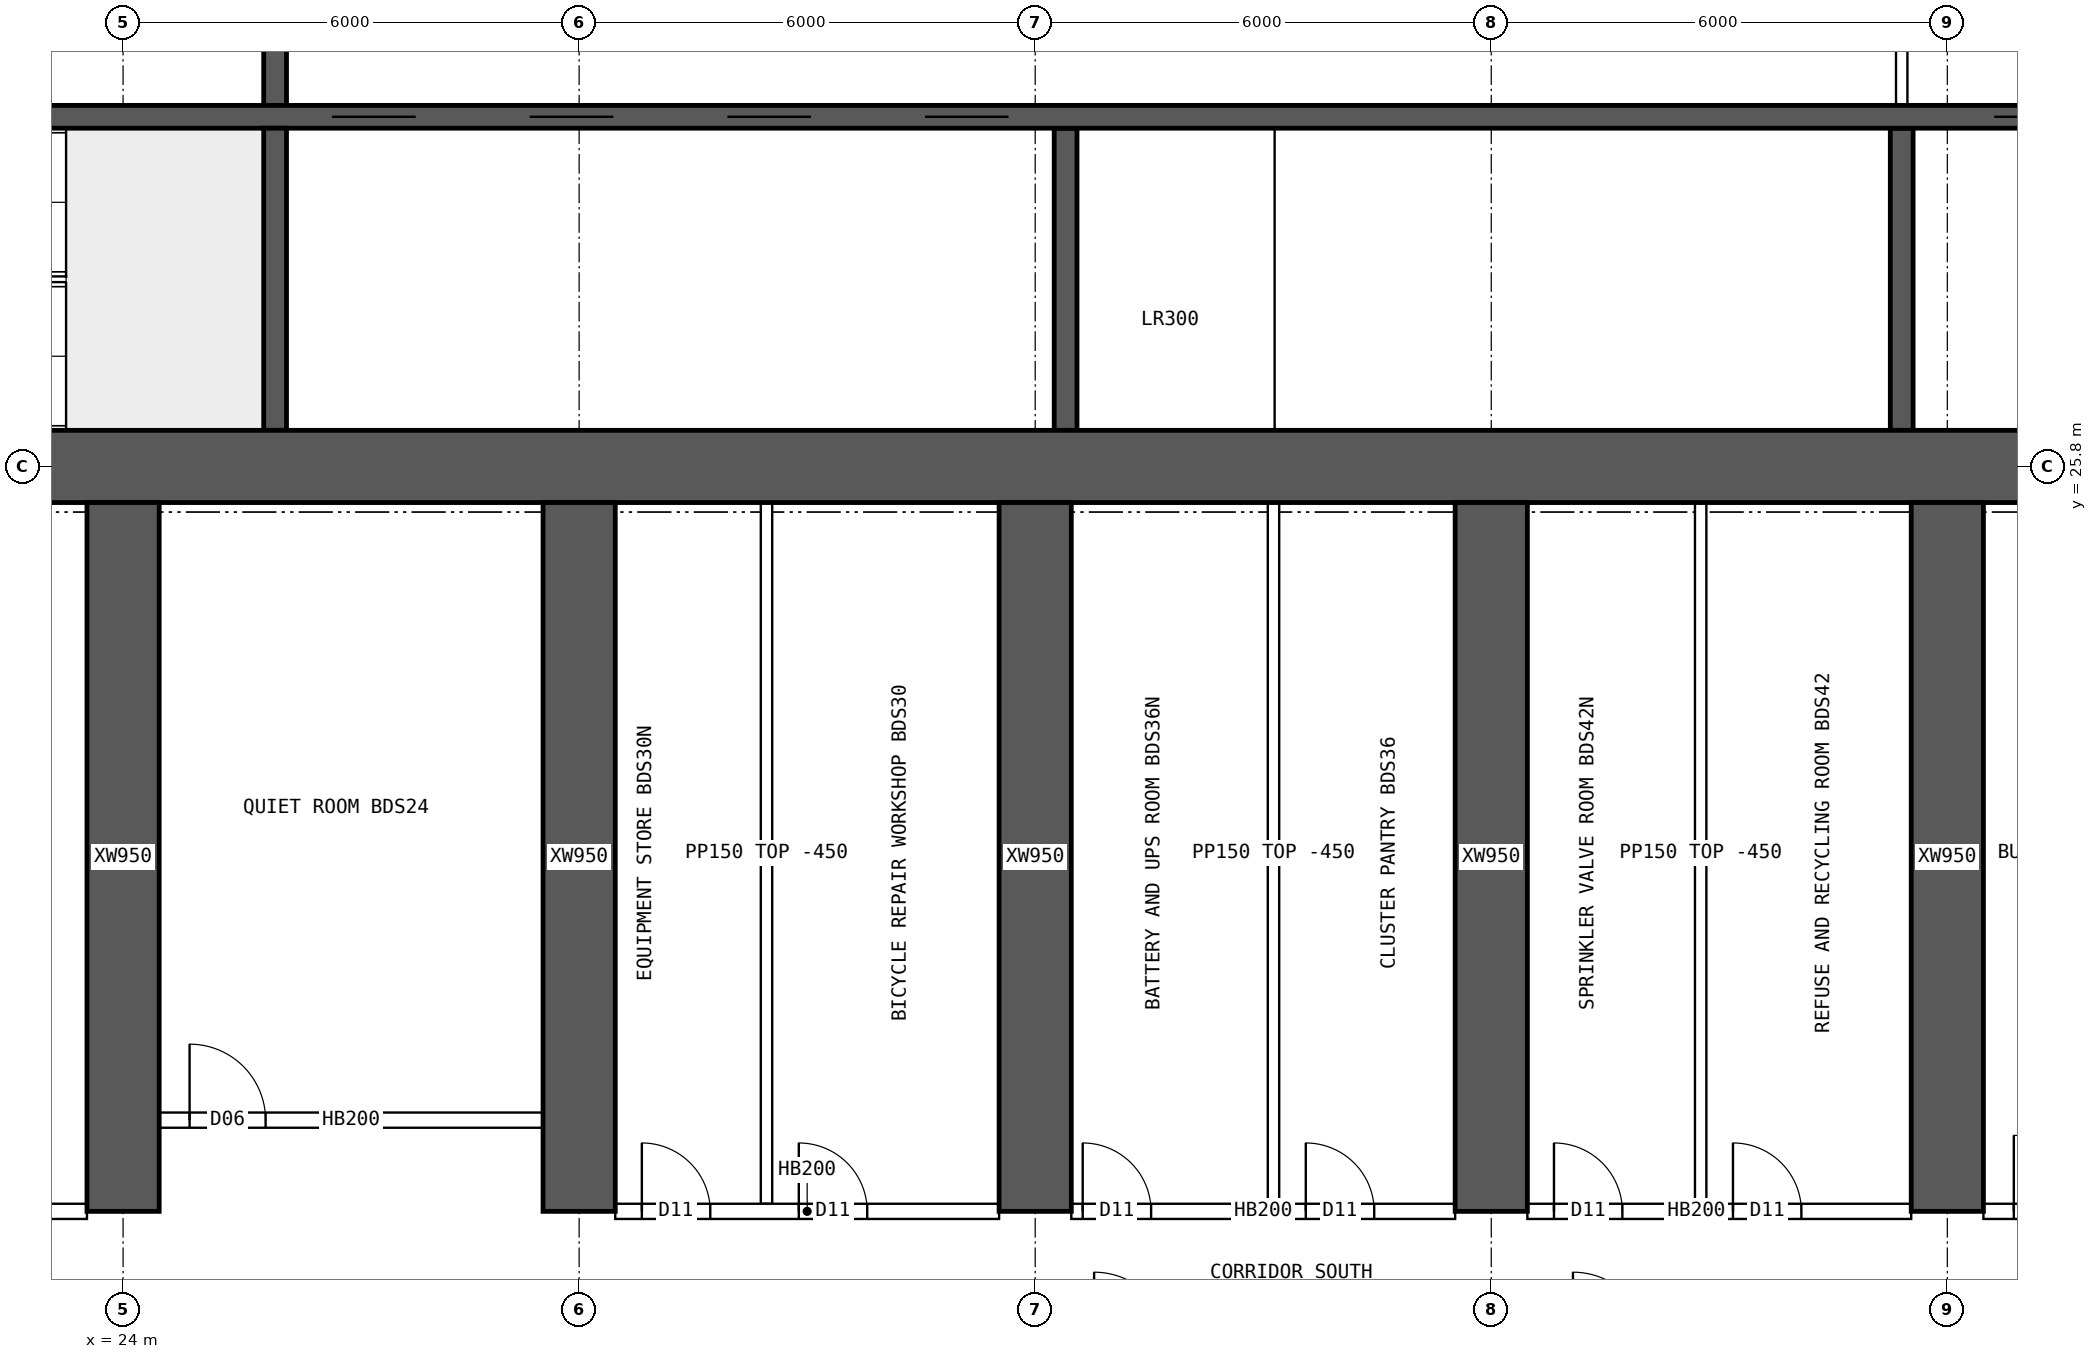
"""IFC4 building model, lengths in metres.
Left out: names, types, materials, properties, quantities, classifications, styles, units other than length and angle.
Written with IfcOpenShell. Run it as: python <this file> out.ifc"""

import sys

from ifc_helpers import new_model, si_unit, direction, frame, frame_2d, origin, place, context, subcontext, project, spatial, rectangle, extrude, element, fill, save


model = new_model("IFC4")
c1 = context("Model", 3, precision=1e-05, world=origin(), true_north=direction((0.0, 1.0)))
c2 = subcontext(c1, "Body", "Model", "MODEL_VIEW")
j1 = project(units=[si_unit("LENGTHUNIT", "METRE"), si_unit("PLANEANGLEUNIT", "RADIAN")], contexts=[c1])
p1 = place(None, origin())
s1 = spatial("IfcSite", under=j1, at=p1, CompositionType="ELEMENT")
p2 = place(p1, origin())
s2 = spatial("IfcBuilding", under=s1, at=p2, CompositionType="ELEMENT")
p3 = place(p2, frame((0.0, 0.0, 80.65)))
s3 = spatial("IfcBuildingStorey", under=s2, at=p3, CompositionType="ELEMENT", Elevation=80.65)
p4 = place(p3, frame((18.0, 25.8, 0.0), z_axis=(0.0, 0.0, 1.0), x_axis=(1.0, 0.0, 0.0)))
e1 = element("IfcWall", 1, at=p4, inside=s3, PredefinedType="SHEAR", context=c2, shape_type="SweptSolid", body=[
    extrude(rectangle(XDim=48.0, YDim=0.95, at=frame_2d((24.0, 0.0))), origin(), (0.0, 0.0, 1.0), 3.75),
])
p5 = place(p3, frame((18.475, 30.4, 0.0), z_axis=(0.0, 0.0, 1.0), x_axis=(1.0, 0.0, 0.0)))
e2 = element("IfcWall", 2, at=p5, inside=s3, PredefinedType="SHEAR", context=c2, shape_type="SweptSolid", body=[
    extrude(rectangle(XDim=47.05, YDim=0.3, at=frame_2d((23.525, 0.0))), origin(), (0.0, 0.0, 1.0), 3.75),
])
p6 = place(p5, frame((0.4, 0.0, 0.0)))
e3 = element("IfcOpeningElement", 3, at=p6, cuts=e2, PredefinedType="OPENING", context=c2, shape_type="SweptSolid", body=[
    extrude(rectangle(XDim=1.0, YDim=2.1, at=frame_2d((0.5, 1.05))), frame((0.0, 0.16, 0.0), z_axis=(0.0, -1.0, 0.0), x_axis=(1.0, 0.0, 0.0)), (0.0, 0.0, 1.0), 0.32),
])
p7 = place(p5, frame((45.65, 0.0, 0.0)))
e4 = element("IfcOpeningElement", 4, at=p7, cuts=e2, PredefinedType="OPENING", context=c2, shape_type="SweptSolid", body=[
    extrude(rectangle(XDim=1.0, YDim=2.1, at=frame_2d((0.5, 1.05))), frame((0.0, 0.16, 0.0), z_axis=(0.0, -1.0, 0.0), x_axis=(1.0, 0.0, 0.0)), (0.0, 0.0, 1.0), 0.32),
])
p8 = place(p5, frame((8.275, 0.0, 0.0)))
e5 = element("IfcOpeningElement", 5, at=p8, cuts=e2, PredefinedType="OPENING", context=c2, shape_type="SweptSolid", body=[
    extrude(rectangle(XDim=1.1, YDim=2.1, at=frame_2d((0.55, 1.05))), frame((0.0, 0.16, 0.0), z_axis=(0.0, -1.0, 0.0), x_axis=(1.0, 0.0, 0.0)), (0.0, 0.0, 1.0), 0.32),
])
p9 = place(p5, frame((10.875, 0.0, 0.0)))
e6 = element("IfcOpeningElement", 6, at=p9, cuts=e2, PredefinedType="OPENING", context=c2, shape_type="SweptSolid", body=[
    extrude(rectangle(XDim=1.1, YDim=2.1, at=frame_2d((0.55, 1.05))), frame((0.0, 0.16, 0.0), z_axis=(0.0, -1.0, 0.0), x_axis=(1.0, 0.0, 0.0)), (0.0, 0.0, 1.0), 0.32),
])
p10 = place(p5, frame((13.475, 0.0, 0.0)))
e7 = element("IfcOpeningElement", 7, at=p10, cuts=e2, PredefinedType="OPENING", context=c2, shape_type="SweptSolid", body=[
    extrude(rectangle(XDim=1.1, YDim=2.1, at=frame_2d((0.55, 1.05))), frame((0.0, 0.16, 0.0), z_axis=(0.0, -1.0, 0.0), x_axis=(1.0, 0.0, 0.0)), (0.0, 0.0, 1.0), 0.32),
])
p11 = place(p5, frame((16.075, 0.0, 0.0)))
e8 = element("IfcOpeningElement", 8, at=p11, cuts=e2, PredefinedType="OPENING", context=c2, shape_type="SweptSolid", body=[
    extrude(rectangle(XDim=1.1, YDim=2.1, at=frame_2d((0.55, 1.05))), frame((0.0, 0.16, 0.0), z_axis=(0.0, -1.0, 0.0), x_axis=(1.0, 0.0, 0.0)), (0.0, 0.0, 1.0), 0.32),
])
p12 = place(p5, frame((30.142, 0.0, 0.0)))
e9 = element("IfcOpeningElement", 9, at=p12, cuts=e2, PredefinedType="OPENING", context=c2, shape_type="SweptSolid", body=[
    extrude(rectangle(XDim=1.1, YDim=2.1, at=frame_2d((0.55, 1.05))), frame((0.0, 0.16, 0.0), z_axis=(0.0, -1.0, 0.0), x_axis=(1.0, 0.0, 0.0)), (0.0, 0.0, 1.0), 0.32),
])
p13 = place(p5, frame((33.675, 0.0, 0.0)))
e10 = element("IfcOpeningElement", 10, at=p13, cuts=e2, PredefinedType="OPENING", context=c2, shape_type="SweptSolid", body=[
    extrude(rectangle(XDim=1.1, YDim=2.1, at=frame_2d((0.55, 1.05))), frame((0.0, 0.16, 0.0), z_axis=(0.0, -1.0, 0.0), x_axis=(1.0, 0.0, 0.0)), (0.0, 0.0, 1.0), 0.32),
])
p14 = place(p5, frame((37.208, 0.0, 0.0)))
e11 = element("IfcOpeningElement", 11, at=p14, cuts=e2, PredefinedType="OPENING", context=c2, shape_type="SweptSolid", body=[
    extrude(rectangle(XDim=1.1, YDim=2.1, at=frame_2d((0.55, 1.05))), frame((0.0, 0.16, 0.0), z_axis=(0.0, -1.0, 0.0), x_axis=(1.0, 0.0, 0.0)), (0.0, 0.0, 1.0), 0.32),
])
p15 = place(p3, frame((26.0, 26.275, 0.0), z_axis=(0.0, 0.0, 1.0), x_axis=(0.0, 1.0, 0.0)))
e12 = element("IfcWall", 12, at=p15, inside=s3, PredefinedType="SHEAR", context=c2, shape_type="SweptSolid", body=[
    extrude(rectangle(XDim=3.975, YDim=0.3, at=frame_2d((1.988, 0.0))), origin(), (0.0, 0.0, 1.0), 3.75),
])
p16 = place(p3, frame((26.0, 30.55, 0.0), z_axis=(0.0, 0.0, 1.0), x_axis=(0.0, 1.0, 0.0)))
e13 = element("IfcWall", 13, at=p16, inside=s3, PredefinedType="SHEAR", context=c2, shape_type="SweptSolid", body=[
    extrude(rectangle(XDim=3.9, YDim=0.3, at=frame_2d((1.95, 0.0))), origin(), (0.0, 0.0, 1.0), 3.75),
])
p17 = place(p16, frame((1.4, 0.0, 0.0)))
e14 = element("IfcOpeningElement", 14, at=p17, cuts=e13, PredefinedType="OPENING", context=c2, shape_type="SweptSolid", body=[
    extrude(rectangle(XDim=1.2, YDim=2.1, at=frame_2d((0.6, 1.05))), frame((0.0, 0.16, 0.0), z_axis=(0.0, -1.0, 0.0), x_axis=(1.0, 0.0, 0.0)), (0.0, 0.0, 1.0), 0.32),
])
for number, where, z_axis, x_axis in (
    (15, (36.4, 26.275, 0.0), (0.0, 0.0, 1.0), (0.0, 1.0, 0.0)),
    (16, (47.4, 26.275, 0.0), (0.0, 0.0, 1.0), (0.0, 1.0, 0.0)),
):
    element("IfcWall", number, at=place(p3, frame(where, z_axis=z_axis, x_axis=x_axis)), inside=s3, PredefinedType="SHEAR", context=c2, shape_type="SweptSolid", body=[
        extrude(rectangle(XDim=3.975, YDim=0.3, at=frame_2d((1.988, 0.0))), origin(), (0.0, 0.0, 1.0), 3.75),
    ])
for number, where, z_axis, x_axis in (
    (17, (24.0, 16.0, 0.0), (0.0, 0.0, 1.0), (0.0, 1.0, 0.0)),
    (18, (30.0, 16.0, 0.0), (0.0, 0.0, 1.0), (0.0, 1.0, 0.0)),
    (19, (36.0, 16.0, 0.0), (0.0, 0.0, 1.0), (0.0, 1.0, 0.0)),
    (20, (42.0, 16.0, 0.0), (0.0, 0.0, 1.0), (0.0, 1.0, 0.0)),
    (21, (48.0, 16.0, 0.0), (0.0, 0.0, 1.0), (0.0, 1.0, 0.0)),
):
    element("IfcWall", number, at=place(p3, frame(where, z_axis=z_axis, x_axis=x_axis)), inside=s3, PredefinedType="SHEAR", context=c2, shape_type="SweptSolid", body=[
        extrude(rectangle(XDim=9.325, YDim=0.95, at=frame_2d((4.663, 0.0))), origin(), (0.0, 0.0, 1.0), 3.75),
    ])
p18 = place(p3, frame((47.4, 30.55, 0.0), z_axis=(0.0, 0.0, 1.0), x_axis=(0.0, 1.0, 0.0)))
e22 = element("IfcWall", 22, at=p18, inside=s3, PredefinedType="SOLIDWALL", context=c2, shape_type="SweptSolid", body=[
    extrude(rectangle(XDim=3.9, YDim=0.15, at=frame_2d((1.95, 0.0))), origin(), (0.0, 0.0, 1.0), 3.3),
])
p19 = place(p18, frame((1.15, 0.0, 0.0)))
e23 = element("IfcOpeningElement", 23, at=p19, cuts=e22, PredefinedType="OPENING", context=c2, shape_type="SweptSolid", body=[
    extrude(rectangle(XDim=1.6, YDim=2.1, at=frame_2d((0.8, 1.05))), frame((0.0, 0.085, 0.0), z_axis=(0.0, -1.0, 0.0), x_axis=(1.0, 0.0, 0.0)), (0.0, 0.0, 1.0), 0.17),
])
p20 = place(p3, frame((18.475, 16.0, 0.0), z_axis=(0.0, 0.0, 1.0), x_axis=(1.0, 0.0, 0.0)))
e24 = element("IfcWall", 24, at=p20, inside=s3, PredefinedType="SOLIDWALL", context=c2, shape_type="SweptSolid", body=[
    extrude(rectangle(XDim=5.05, YDim=0.2, at=frame_2d((2.525, 0.0))), origin(), (0.0, 0.0, 1.0), 3.3),
])
p21 = place(p20, frame((0.35, 0.0, 0.0)))
e25 = element("IfcOpeningElement", 25, at=p21, cuts=e24, PredefinedType="OPENING", context=c2, shape_type="SweptSolid", body=[
    extrude(rectangle(XDim=0.9, YDim=2.1, at=frame_2d((0.45, 1.05))), frame((0.0, 0.11, 0.0), z_axis=(0.0, -1.0, 0.0), x_axis=(1.0, 0.0, 0.0)), (0.0, 0.0, 1.0), 0.22),
])
p22 = place(p20, frame((3.215, 0.0, 0.0)))
e26 = element("IfcOpeningElement", 26, at=p22, cuts=e24, PredefinedType="OPENING", context=c2, shape_type="SweptSolid", body=[
    extrude(rectangle(XDim=0.9, YDim=2.1, at=frame_2d((0.45, 1.05))), frame((0.0, 0.11, 0.0), z_axis=(0.0, -1.0, 0.0), x_axis=(1.0, 0.0, 0.0)), (0.0, 0.0, 1.0), 0.22),
])
p23 = place(p3, frame((30.475, 16.0, 0.0), z_axis=(0.0, 0.0, 1.0), x_axis=(1.0, 0.0, 0.0)))
e27 = element("IfcWall", 27, at=p23, inside=s3, PredefinedType="SOLIDWALL", context=c2, shape_type="SweptSolid", body=[
    extrude(rectangle(XDim=5.05, YDim=0.2, at=frame_2d((2.525, 0.0))), origin(), (0.0, 0.0, 1.0), 3.3),
])
p24 = place(p23, frame((0.35, 0.0, 0.0)))
e28 = element("IfcOpeningElement", 28, at=p24, cuts=e27, PredefinedType="OPENING", context=c2, shape_type="SweptSolid", body=[
    extrude(rectangle(XDim=0.9, YDim=2.1, at=frame_2d((0.45, 1.05))), frame((0.0, 0.11, 0.0), z_axis=(0.0, -1.0, 0.0), x_axis=(1.0, 0.0, 0.0)), (0.0, 0.0, 1.0), 0.22),
])
p25 = place(p23, frame((2.415, 0.0, 0.0)))
e29 = element("IfcOpeningElement", 29, at=p25, cuts=e27, PredefinedType="OPENING", context=c2, shape_type="SweptSolid", body=[
    extrude(rectangle(XDim=0.9, YDim=2.1, at=frame_2d((0.45, 1.05))), frame((0.0, 0.11, 0.0), z_axis=(0.0, -1.0, 0.0), x_axis=(1.0, 0.0, 0.0)), (0.0, 0.0, 1.0), 0.22),
])
p26 = place(p3, frame((36.475, 16.0, 0.0), z_axis=(0.0, 0.0, 1.0), x_axis=(1.0, 0.0, 0.0)))
e30 = element("IfcWall", 30, at=p26, inside=s3, PredefinedType="SOLIDWALL", context=c2, shape_type="SweptSolid", body=[
    extrude(rectangle(XDim=5.05, YDim=0.2, at=frame_2d((2.525, 0.0))), origin(), (0.0, 0.0, 1.0), 3.3),
])
p27 = place(p26, frame((0.15, 0.0, 0.0)))
e31 = element("IfcOpeningElement", 31, at=p27, cuts=e30, PredefinedType="OPENING", context=c2, shape_type="SweptSolid", body=[
    extrude(rectangle(XDim=0.9, YDim=2.1, at=frame_2d((0.45, 1.05))), frame((0.0, 0.11, 0.0), z_axis=(0.0, -1.0, 0.0), x_axis=(1.0, 0.0, 0.0)), (0.0, 0.0, 1.0), 0.22),
])
p28 = place(p26, frame((3.085, 0.0, 0.0)))
e32 = element("IfcOpeningElement", 32, at=p28, cuts=e30, PredefinedType="OPENING", context=c2, shape_type="SweptSolid", body=[
    extrude(rectangle(XDim=0.9, YDim=2.1, at=frame_2d((0.45, 1.05))), frame((0.0, 0.11, 0.0), z_axis=(0.0, -1.0, 0.0), x_axis=(1.0, 0.0, 0.0)), (0.0, 0.0, 1.0), 0.22),
])
p29 = place(p3, frame((42.475, 16.0, 0.0), z_axis=(0.0, 0.0, 1.0), x_axis=(1.0, 0.0, 0.0)))
e33 = element("IfcWall", 33, at=p29, inside=s3, PredefinedType="SOLIDWALL", context=c2, shape_type="SweptSolid", body=[
    extrude(rectangle(XDim=5.05, YDim=0.2, at=frame_2d((2.525, 0.0))), origin(), (0.0, 0.0, 1.0), 3.3),
])
p30 = place(p29, frame((0.35, 0.0, 0.0)))
e34 = element("IfcOpeningElement", 34, at=p30, cuts=e33, PredefinedType="OPENING", context=c2, shape_type="SweptSolid", body=[
    extrude(rectangle(XDim=0.9, YDim=2.1, at=frame_2d((0.45, 1.05))), frame((0.0, 0.11, 0.0), z_axis=(0.0, -1.0, 0.0), x_axis=(1.0, 0.0, 0.0)), (0.0, 0.0, 1.0), 0.22),
])
p31 = place(p29, frame((2.705, 0.0, 0.0)))
e35 = element("IfcOpeningElement", 35, at=p31, cuts=e33, PredefinedType="OPENING", context=c2, shape_type="SweptSolid", body=[
    extrude(rectangle(XDim=0.9, YDim=2.1, at=frame_2d((0.45, 1.05))), frame((0.0, 0.11, 0.0), z_axis=(0.0, -1.0, 0.0), x_axis=(1.0, 0.0, 0.0)), (0.0, 0.0, 1.0), 0.22),
])
p32 = place(p3, frame((48.475, 16.0, 0.0), z_axis=(0.0, 0.0, 1.0), x_axis=(1.0, 0.0, 0.0)))
e36 = element("IfcWall", 36, at=p32, inside=s3, PredefinedType="SOLIDWALL", context=c2, shape_type="SweptSolid", body=[
    extrude(rectangle(XDim=5.05, YDim=0.2, at=frame_2d((2.525, 0.0))), origin(), (0.0, 0.0, 1.0), 3.3),
])
p33 = place(p32, frame((0.4, 0.0, 0.0)))
e37 = element("IfcOpeningElement", 37, at=p33, cuts=e36, PredefinedType="OPENING", context=c2, shape_type="SweptSolid", body=[
    extrude(rectangle(XDim=1.0, YDim=2.1, at=frame_2d((0.5, 1.05))), frame((0.0, 0.11, 0.0), z_axis=(0.0, -1.0, 0.0), x_axis=(1.0, 0.0, 0.0)), (0.0, 0.0, 1.0), 0.22),
])
p34 = place(p3, frame((24.475, 17.2, 0.0), z_axis=(0.0, 0.0, 1.0), x_axis=(1.0, 0.0, 0.0)))
e38 = element("IfcWall", 38, at=p34, inside=s3, PredefinedType="SOLIDWALL", context=c2, shape_type="SweptSolid", body=[
    extrude(rectangle(XDim=5.05, YDim=0.2, at=frame_2d((2.525, 0.0))), origin(), (0.0, 0.0, 1.0), 3.3),
])
p35 = place(p34, frame((0.4, 0.0, 0.0)))
e39 = element("IfcOpeningElement", 39, at=p35, cuts=e38, PredefinedType="OPENING", context=c2, shape_type="SweptSolid", body=[
    extrude(rectangle(XDim=1.0, YDim=2.1, at=frame_2d((0.5, 1.05))), frame((0.0, 0.11, 0.0), z_axis=(0.0, -1.0, 0.0), x_axis=(1.0, 0.0, 0.0)), (0.0, 0.0, 1.0), 0.22),
])
for number, where, z_axis, x_axis in (
    (40, (32.465, 16.1, 0.0), (0.0, 0.0, 1.0), (0.0, 1.0, 0.0)),
    (41, (39.135, 16.1, 0.0), (0.0, 0.0, 1.0), (0.0, 1.0, 0.0)),
    (42, (44.755, 16.1, 0.0), (0.0, 0.0, 1.0), (0.0, 1.0, 0.0)),
):
    element("IfcWall", number, at=place(p3, frame(where, z_axis=z_axis, x_axis=x_axis)), inside=s3, PredefinedType="PARTITIONING", context=c2, shape_type="SweptSolid", body=[
        extrude(rectangle(XDim=9.225, YDim=0.15, at=frame_2d((4.612, 0.0))), origin(), (0.0, 0.0, 1.0), 3.3),
    ])
p36 = place(p8, origin())
e43 = element("IfcDoor", 43, at=p36, inside=s3, OperationType="DOUBLE_DOOR_SLIDING", PredefinedType="DOOR", context=c2, shape_type="SweptSolid", body=[
    extrude(rectangle(XDim=1.1, YDim=2.1, at=frame_2d((0.55, 1.05))), frame((0.0, 0.025, 0.0), z_axis=(0.0, -1.0, 0.0), x_axis=(1.0, 0.0, 0.0)), (0.0, 0.0, 1.0), 0.05),
])
fill(e5, e43)
p37 = place(p9, origin())
e44 = element("IfcDoor", 44, at=p37, inside=s3, OperationType="DOUBLE_DOOR_SLIDING", PredefinedType="DOOR", context=c2, shape_type="SweptSolid", body=[
    extrude(rectangle(XDim=1.1, YDim=2.1, at=frame_2d((0.55, 1.05))), frame((0.0, 0.025, 0.0), z_axis=(0.0, -1.0, 0.0), x_axis=(1.0, 0.0, 0.0)), (0.0, 0.0, 1.0), 0.05),
])
fill(e6, e44)
p38 = place(p10, origin())
e45 = element("IfcDoor", 45, at=p38, inside=s3, OperationType="DOUBLE_DOOR_SLIDING", PredefinedType="DOOR", context=c2, shape_type="SweptSolid", body=[
    extrude(rectangle(XDim=1.1, YDim=2.1, at=frame_2d((0.55, 1.05))), frame((0.0, 0.025, 0.0), z_axis=(0.0, -1.0, 0.0), x_axis=(1.0, 0.0, 0.0)), (0.0, 0.0, 1.0), 0.05),
])
fill(e7, e45)
p39 = place(p11, origin())
e46 = element("IfcDoor", 46, at=p39, inside=s3, OperationType="DOUBLE_DOOR_SLIDING", PredefinedType="DOOR", context=c2, shape_type="SweptSolid", body=[
    extrude(rectangle(XDim=1.1, YDim=2.1, at=frame_2d((0.55, 1.05))), frame((0.0, 0.025, 0.0), z_axis=(0.0, -1.0, 0.0), x_axis=(1.0, 0.0, 0.0)), (0.0, 0.0, 1.0), 0.05),
])
fill(e8, e46)
p40 = place(p12, origin())
e47 = element("IfcDoor", 47, at=p40, inside=s3, OperationType="DOUBLE_DOOR_SLIDING", PredefinedType="DOOR", context=c2, shape_type="SweptSolid", body=[
    extrude(rectangle(XDim=1.1, YDim=2.1, at=frame_2d((0.55, 1.05))), frame((0.0, 0.025, 0.0), z_axis=(0.0, -1.0, 0.0), x_axis=(1.0, 0.0, 0.0)), (0.0, 0.0, 1.0), 0.05),
])
fill(e9, e47)
p41 = place(p35, origin())
e48 = element("IfcDoor", 48, at=p41, inside=s3, OperationType="SINGLE_SWING_LEFT", PredefinedType="DOOR", context=c2, shape_type="SweptSolid", body=[
    extrude(rectangle(XDim=1.0, YDim=2.1, at=frame_2d((0.5, 1.05))), frame((0.0, 0.025, 0.0), z_axis=(0.0, -1.0, 0.0), x_axis=(1.0, 0.0, 0.0)), (0.0, 0.0, 1.0), 0.05),
])
fill(e39, e48)
p42 = place(p24, origin())
e49 = element("IfcDoor", 49, at=p42, inside=s3, OperationType="SINGLE_SWING_LEFT", PredefinedType="DOOR", context=c2, shape_type="SweptSolid", body=[
    extrude(rectangle(XDim=0.9, YDim=2.1, at=frame_2d((0.45, 1.05))), frame((0.0, 0.025, 0.0), z_axis=(0.0, -1.0, 0.0), x_axis=(1.0, 0.0, 0.0)), (0.0, 0.0, 1.0), 0.05),
])
fill(e28, e49)
p43 = place(p25, origin())
e50 = element("IfcDoor", 50, at=p43, inside=s3, OperationType="SINGLE_SWING_LEFT", PredefinedType="DOOR", context=c2, shape_type="SweptSolid", body=[
    extrude(rectangle(XDim=0.9, YDim=2.1, at=frame_2d((0.45, 1.05))), frame((0.0, 0.025, 0.0), z_axis=(0.0, -1.0, 0.0), x_axis=(1.0, 0.0, 0.0)), (0.0, 0.0, 1.0), 0.05),
])
fill(e29, e50)
p44 = place(p27, origin())
e51 = element("IfcDoor", 51, at=p44, inside=s3, OperationType="SINGLE_SWING_LEFT", PredefinedType="DOOR", context=c2, shape_type="SweptSolid", body=[
    extrude(rectangle(XDim=0.9, YDim=2.1, at=frame_2d((0.45, 1.05))), frame((0.0, 0.025, 0.0), z_axis=(0.0, -1.0, 0.0), x_axis=(1.0, 0.0, 0.0)), (0.0, 0.0, 1.0), 0.05),
])
fill(e31, e51)
p45 = place(p28, origin())
e52 = element("IfcDoor", 52, at=p45, inside=s3, OperationType="SINGLE_SWING_LEFT", PredefinedType="DOOR", context=c2, shape_type="SweptSolid", body=[
    extrude(rectangle(XDim=0.9, YDim=2.1, at=frame_2d((0.45, 1.05))), frame((0.0, 0.025, 0.0), z_axis=(0.0, -1.0, 0.0), x_axis=(1.0, 0.0, 0.0)), (0.0, 0.0, 1.0), 0.05),
])
fill(e32, e52)
p46 = place(p30, origin())
e53 = element("IfcDoor", 53, at=p46, inside=s3, OperationType="SINGLE_SWING_LEFT", PredefinedType="DOOR", context=c2, shape_type="SweptSolid", body=[
    extrude(rectangle(XDim=0.9, YDim=2.1, at=frame_2d((0.45, 1.05))), frame((0.0, 0.025, 0.0), z_axis=(0.0, -1.0, 0.0), x_axis=(1.0, 0.0, 0.0)), (0.0, 0.0, 1.0), 0.05),
])
fill(e34, e53)
p47 = place(p31, origin())
e54 = element("IfcDoor", 54, at=p47, inside=s3, OperationType="SINGLE_SWING_LEFT", PredefinedType="DOOR", context=c2, shape_type="SweptSolid", body=[
    extrude(rectangle(XDim=0.9, YDim=2.1, at=frame_2d((0.45, 1.05))), frame((0.0, 0.025, 0.0), z_axis=(0.0, -1.0, 0.0), x_axis=(1.0, 0.0, 0.0)), (0.0, 0.0, 1.0), 0.05),
])
fill(e35, e54)
p48 = place(p33, origin())
e55 = element("IfcDoor", 55, at=p48, inside=s3, OperationType="SINGLE_SWING_LEFT", PredefinedType="DOOR", context=c2, shape_type="SweptSolid", body=[
    extrude(rectangle(XDim=1.0, YDim=2.1, at=frame_2d((0.5, 1.05))), frame((0.0, 0.025, 0.0), z_axis=(0.0, -1.0, 0.0), x_axis=(1.0, 0.0, 0.0)), (0.0, 0.0, 1.0), 0.05),
])
fill(e37, e55)
save(model, sys.argv[1])
